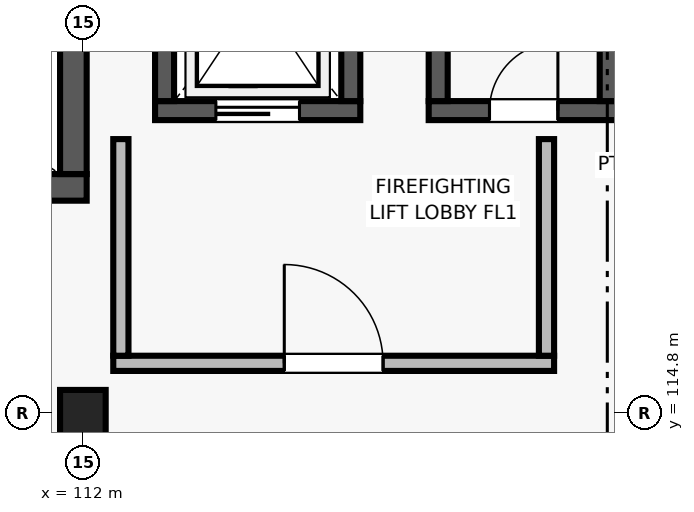
"""IFC4 building model, lengths in metres.
Left out: names, types, materials, properties, quantities, classifications, styles, units other than length and angle.
Written with IfcOpenShell. Run it as: python <this file> out.ifc"""

import sys

from ifc_helpers import new_model, si_unit, direction, frame, frame_2d, origin, origin_2d, place, context, subcontext, project, spatial, rectangle, extrude, element, fill, save


model = new_model("IFC4")
c1 = context("Model", 3, precision=1e-05, world=origin(), true_north=direction((0.0, 1.0)))
c2 = subcontext(c1, "Body", "Model", "MODEL_VIEW")
j1 = project(units=[si_unit("LENGTHUNIT", "METRE"), si_unit("PLANEANGLEUNIT", "RADIAN")], contexts=[c1])
p1 = place(None, origin())
s1 = spatial("IfcSite", under=j1, at=p1, CompositionType="ELEMENT")
p2 = place(p1, origin())
s2 = spatial("IfcBuilding", under=s1, at=p2, CompositionType="ELEMENT")
p3 = place(p2, frame((0.0, 0.0, 13.2)))
s3 = spatial("IfcBuildingStorey", under=s2, at=p3, CompositionType="ELEMENT", Elevation=13.2)
p4 = place(p3, frame((112.0, 114.8, 0.0), z_axis=(0.0, 0.0, 1.0), x_axis=(1.0, 0.0, 0.0)))
e1 = element("IfcColumn", 1, at=p4, inside=s3, PredefinedType="COLUMN", context=c2, shape_type="SweptSolid", body=[
    extrude(rectangle(XDim=0.6, YDim=0.6, at=origin_2d()), origin(), (0.0, 0.0, 1.0), 4.2),
])
p5 = place(p3, frame((103.95, 117.765, 0.0), z_axis=(0.0, 0.0, 1.0), x_axis=(1.0, 0.0, 0.0)))
e2 = element("IfcWall", 2, at=p5, inside=s3, PredefinedType="SHEAR", context=c2, shape_type="SweptSolid", body=[
    extrude(rectangle(XDim=8.1, YDim=0.35, at=frame_2d((4.05, 0.0))), origin(), (0.0, 0.0, 1.0), 3.92),
])
p6 = place(p5, frame((0.6, 0.0, 0.0)))
e3 = element("IfcOpeningElement", 3, at=p6, cuts=e2, PredefinedType="OPENING", context=c2, shape_type="SweptSolid", body=[
    extrude(rectangle(XDim=1.25, YDim=2.2, at=frame_2d((0.625, 1.1))), frame((0.0, 0.185, 0.0), z_axis=(0.0, -1.0, 0.0), x_axis=(1.0, 0.0, 0.0)), (0.0, 0.0, 1.0), 0.37),
])
p7 = place(p3, frame((111.875, 117.94, 0.0), z_axis=(0.0, 0.0, 1.0), x_axis=(0.0, 1.0, 0.0)))
e4 = element("IfcWall", 4, at=p7, inside=s3, PredefinedType="SHEAR", context=c2, shape_type="SweptSolid", body=[
    extrude(rectangle(XDim=3.76, YDim=0.35, at=frame_2d((1.88, 0.0))), origin(), (0.0, 0.0, 1.0), 3.92),
])
p8 = place(p3, frame((112.95, 118.775, 0.0), z_axis=(0.0, 0.0, 1.0), x_axis=(1.0, 0.0, 0.0)))
e5 = element("IfcWall", 5, at=p8, inside=s3, PredefinedType="SHEAR", context=c2, shape_type="SweptSolid", body=[
    extrude(rectangle(XDim=2.7, YDim=0.25, at=frame_2d((1.35, 0.0))), origin(), (0.0, 0.0, 1.0), 3.92),
])
p9 = place(p8, frame((0.8, 0.0, 0.0)))
e6 = element("IfcOpeningElement", 6, at=p9, cuts=e5, PredefinedType="OPENING", context=c2, shape_type="SweptSolid", body=[
    extrude(rectangle(XDim=1.1, YDim=2.15, at=frame_2d((0.55, 1.075))), frame((0.0, 0.135, 0.0), z_axis=(0.0, -1.0, 0.0), x_axis=(1.0, 0.0, 0.0)), (0.0, 0.0, 1.0), 0.27),
])
for number, where, z_axis, x_axis in (
    (7, (113.075, 118.9, 0.0), (0.0, 0.0, 1.0), (0.0, 1.0, 0.0)),
    (8, (115.525, 118.9, 0.0), (0.0, 0.0, 1.0), (0.0, 1.0, 0.0)),
):
    element("IfcWall", number, at=place(p3, frame(where, z_axis=z_axis, x_axis=x_axis)), inside=s3, PredefinedType="SHEAR", context=c2, shape_type="SweptSolid", body=[
        extrude(rectangle(XDim=2.8, YDim=0.25, at=frame_2d((1.4, 0.0))), origin(), (0.0, 0.0, 1.0), 3.92),
    ])
p10 = place(p3, frame((112.4, 115.45, 0.0), z_axis=(0.0, 0.0, 1.0), x_axis=(1.0, 0.0, 0.0)))
e9 = element("IfcWall", 9, at=p10, inside=s3, PredefinedType="SOLIDWALL", context=c2, shape_type="SweptSolid", body=[
    extrude(rectangle(XDim=5.8, YDim=0.2, at=frame_2d((2.9, 0.0))), origin(), (0.0, 0.0, 1.0), 3.92),
])
p11 = place(p10, frame((2.25, 0.0, 0.0)))
e10 = element("IfcOpeningElement", 10, at=p11, cuts=e9, PredefinedType="OPENING", context=c2, shape_type="SweptSolid", body=[
    extrude(rectangle(XDim=1.3, YDim=2.2, at=frame_2d((0.65, 1.1))), frame((0.0, 0.11, 0.0), z_axis=(0.0, -1.0, 0.0), x_axis=(1.0, 0.0, 0.0)), (0.0, 0.0, 1.0), 0.22),
])
for number, where, z_axis, x_axis in (
    (11, (112.5, 115.55, 0.0), (0.0, 0.0, 1.0), (0.0, 1.0, 0.0)),
    (12, (118.1, 115.55, 0.0), (0.0, 0.0, 1.0), (0.0, 1.0, 0.0)),
):
    element("IfcWall", number, at=place(p3, frame(where, z_axis=z_axis, x_axis=x_axis)), inside=s3, PredefinedType="SOLIDWALL", context=c2, shape_type="SweptSolid", body=[
        extrude(rectangle(XDim=2.85, YDim=0.2, at=frame_2d((1.425, 0.0))), origin(), (0.0, 0.0, 1.0), 3.92),
    ])
p12 = place(p3, frame((116.55, 118.775, 0.0), z_axis=(0.0, 0.0, 1.0), x_axis=(1.0, 0.0, 0.0)))
e13 = element("IfcWall", 13, at=p12, inside=s3, PredefinedType="SHEAR", context=c2, shape_type="SweptSolid", body=[
    extrude(rectangle(XDim=2.5, YDim=0.25, at=frame_2d((1.25, 0.0))), origin(), (0.0, 0.0, 1.0), 3.92),
])
p13 = place(p12, frame((0.8, 0.0, 0.0)))
e14 = element("IfcOpeningElement", 14, at=p13, cuts=e13, PredefinedType="OPENING", context=c2, shape_type="SweptSolid", body=[
    extrude(rectangle(XDim=0.9, YDim=2.05, at=frame_2d((0.45, 1.025))), frame((0.0, 0.135, 0.0), z_axis=(0.0, -1.0, 0.0), x_axis=(1.0, 0.0, 0.0)), (0.0, 0.0, 1.0), 0.27),
])
for number, where, z_axis, x_axis in (
    (15, (116.675, 118.9, 0.0), (0.0, 0.0, 1.0), (0.0, 1.0, 0.0)),
    (16, (118.925, 118.9, 0.0), (0.0, 0.0, 1.0), (0.0, 1.0, 0.0)),
):
    element("IfcWall", number, at=place(p3, frame(where, z_axis=z_axis, x_axis=x_axis)), inside=s3, PredefinedType="SHEAR", context=c2, shape_type="SweptSolid", body=[
        extrude(rectangle(XDim=2.8, YDim=0.25, at=frame_2d((1.4, 0.0))), origin(), (0.0, 0.0, 1.0), 3.92),
    ])
p14 = place(p11, origin())
e17 = element("IfcDoor", 17, at=p14, inside=s3, OperationType="SINGLE_SWING_LEFT", PredefinedType="DOOR", context=c2, shape_type="SweptSolid", body=[
    extrude(rectangle(XDim=1.3, YDim=2.2, at=frame_2d((0.65, 1.1))), frame((0.0, 0.025, 0.0), z_axis=(0.0, -1.0, 0.0), x_axis=(1.0, 0.0, 0.0)), (0.0, 0.0, 1.0), 0.05),
])
fill(e10, e17)
p15 = place(p13, origin())
e18 = element("IfcDoor", 18, at=p15, inside=s3, OperationType="SINGLE_SWING_RIGHT", PredefinedType="DOOR", context=c2, shape_type="SweptSolid", body=[
    extrude(rectangle(XDim=0.9, YDim=2.05, at=frame_2d((0.45, 1.025))), frame((0.0, 0.025, 0.0), z_axis=(0.0, -1.0, 0.0), x_axis=(1.0, 0.0, 0.0)), (0.0, 0.0, 1.0), 0.05),
])
fill(e14, e18)
p16 = place(p9, origin())
e19 = element("IfcDoor", 19, at=p16, inside=s3, OperationType="SLIDING_TO_LEFT", PredefinedType="DOOR", context=c2, shape_type="SweptSolid", body=[
    extrude(rectangle(XDim=1.1, YDim=2.15, at=frame_2d((0.55, 1.075))), frame((0.0, 0.025, 0.0), z_axis=(0.0, -1.0, 0.0), x_axis=(1.0, 0.0, 0.0)), (0.0, 0.0, 1.0), 0.05),
])
fill(e6, e19)
save(model, sys.argv[1])
